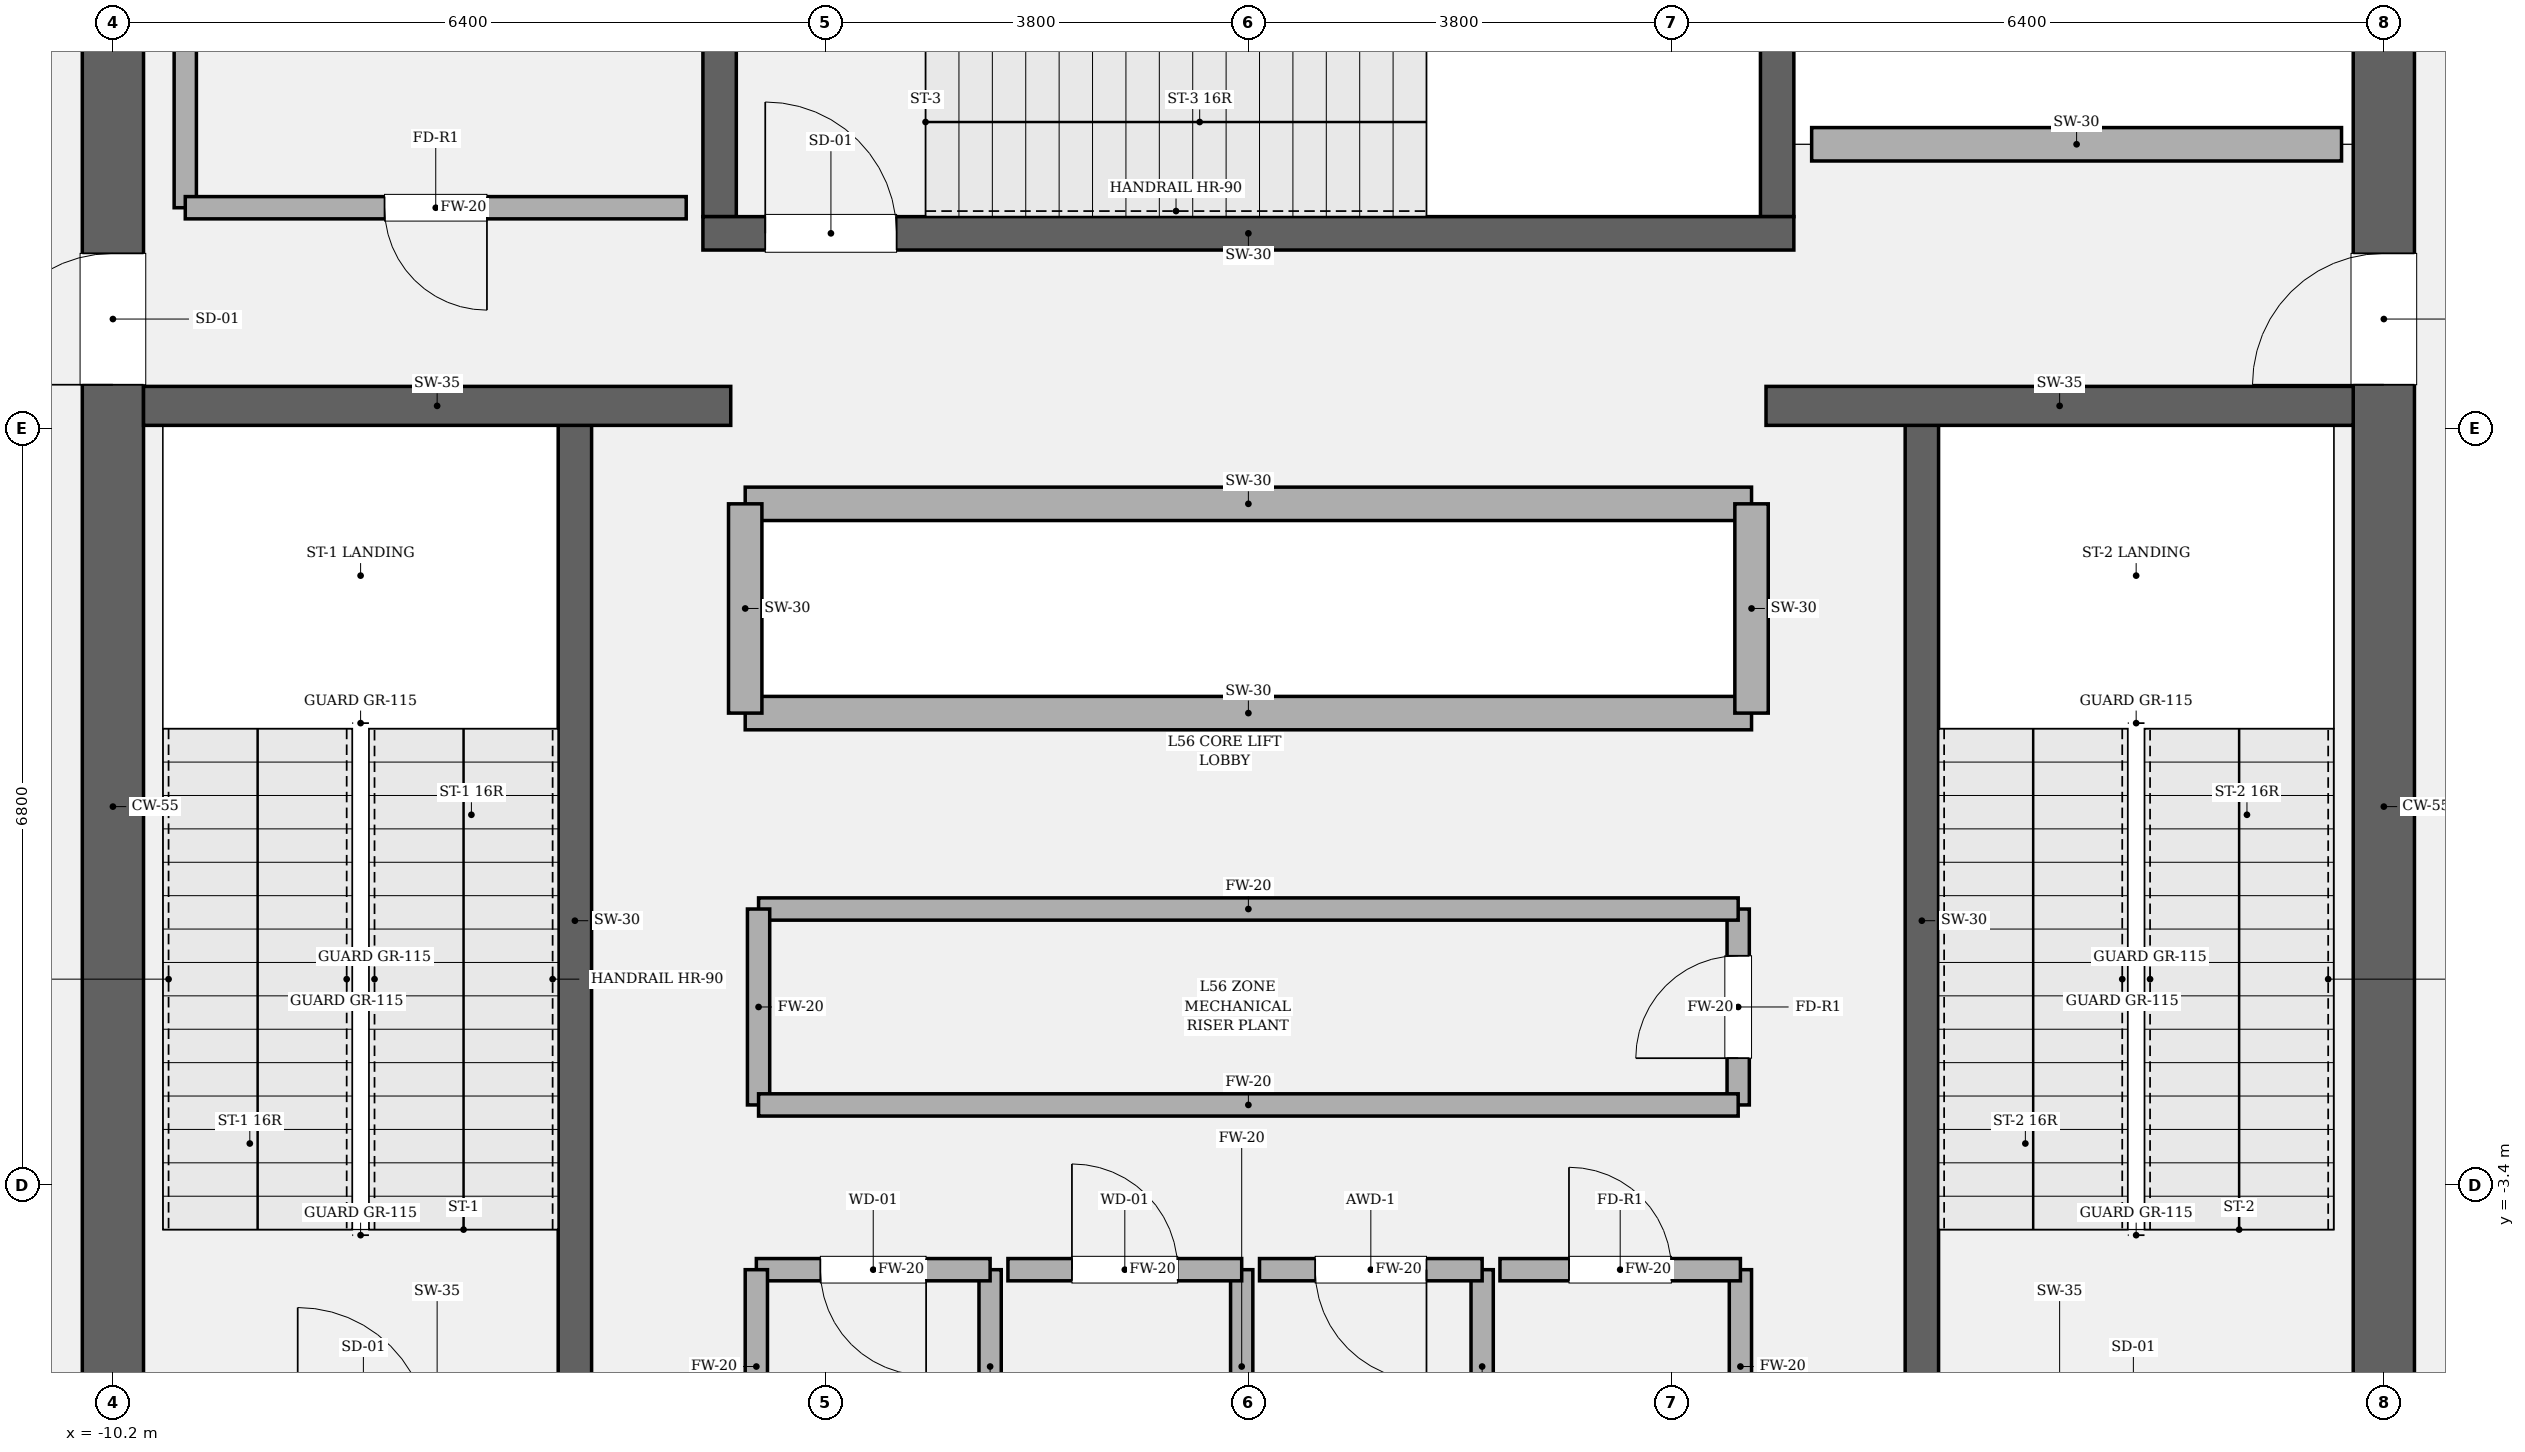
"""IFC4 building model, lengths in metres.
Left out: names, types, materials, properties, quantities, classifications, styles, units other than length and angle.
Written with IfcOpenShell. Run it as: python <this file> out.ifc"""

import sys

from ifc_helpers import new_model, si_unit, direction, frame, frame_2d, origin, place, context, subcontext, project, spatial, rectangle, extrude, element, fill, save


model = new_model("IFC4")
c1 = context("Model", 3, precision=1e-05, world=origin(), true_north=direction((0.0, 1.0)))
c2 = subcontext(c1, "Body", "Model", "MODEL_VIEW")
j1 = project(units=[si_unit("LENGTHUNIT", "METRE"), si_unit("PLANEANGLEUNIT", "RADIAN")], contexts=[c1])
p1 = place(None, origin())
s1 = spatial("IfcSite", under=j1, at=p1, CompositionType="ELEMENT")
p2 = place(p1, origin())
s2 = spatial("IfcBuilding", under=s1, at=p2, CompositionType="ELEMENT")
p3 = place(p2, frame((0.0, 0.0, 237.0)))
s3 = spatial("IfcBuildingStorey", under=s2, at=p3, CompositionType="ELEMENT", Elevation=237.0)
p4 = place(p3, frame((-10.2, -8.925, 0.0), z_axis=(0.0, 0.0, 1.0), x_axis=(0.0, 1.0, 0.0)))
e1 = element("IfcWall", 1, at=p4, inside=s3, PredefinedType="SHEAR", context=c2, shape_type="SweptSolid", body=[
    extrude(rectangle(XDim=17.85, YDim=0.55, at=frame_2d((8.925, 0.0))), origin(), (0.0, 0.0, 1.0), 4.8),
])
p5 = place(p4, frame((12.715, 0.0, 0.0)))
e2 = element("IfcOpeningElement", 2, at=p5, cuts=e1, PredefinedType="OPENING", context=c2, shape_type="SweptSolid", body=[
    extrude(rectangle(XDim=1.18, YDim=2.2, at=frame_2d((0.59, 1.1))), frame((0.0, 0.285, 0.0), z_axis=(0.0, -1.0, 0.0), x_axis=(1.0, 0.0, 0.0)), (0.0, 0.0, 1.0), 0.57),
])
p6 = place(p3, frame((10.2, 8.925, 0.0), z_axis=(0.0, 0.0, 1.0), x_axis=(0.0, -1.0, 0.0)))
e3 = element("IfcWall", 3, at=p6, inside=s3, PredefinedType="SHEAR", context=c2, shape_type="SweptSolid", body=[
    extrude(rectangle(XDim=17.85, YDim=0.55, at=frame_2d((8.925, 0.0))), origin(), (0.0, 0.0, 1.0), 4.8),
])
p7 = place(p6, frame((3.955, 0.0, 0.0)))
e4 = element("IfcOpeningElement", 4, at=p7, cuts=e3, PredefinedType="OPENING", context=c2, shape_type="SweptSolid", body=[
    extrude(rectangle(XDim=1.18, YDim=2.2, at=frame_2d((0.59, 1.1))), frame((0.0, 0.285, 0.0), z_axis=(0.0, -1.0, 0.0), x_axis=(1.0, 0.0, 0.0)), (0.0, 0.0, 1.0), 0.57),
])
for number, where, z_axis, x_axis in (
    (5, (-6.05, -5.5, 0.0), (0.0, 0.0, 1.0), (0.0, 1.0, 0.0)),
    (6, (6.05, 3.45, 0.0), (0.0, 0.0, 1.0), (0.0, -1.0, 0.0)),
):
    element("IfcWall", number, at=place(p3, frame(where, z_axis=z_axis, x_axis=x_axis)), inside=s3, PredefinedType="SOLIDWALL", context=c2, shape_type="SweptSolid", body=[
        extrude(rectangle(XDim=8.95, YDim=0.3, at=frame_2d((4.475, 0.0))), origin(), (0.0, 0.0, 1.0), 4.8),
    ])
for number, where, z_axis, x_axis in (
    (7, (-4.75, 5.3, 0.0), (0.0, 0.0, 1.0), (0.0, 1.0, 0.0)),
    (8, (4.75, 8.925, 0.0), (0.0, 0.0, 1.0), (0.0, -1.0, 0.0)),
):
    element("IfcWall", number, at=place(p3, frame(where, z_axis=z_axis, x_axis=x_axis)), inside=s3, PredefinedType="SOLIDWALL", context=c2, shape_type="SweptSolid", body=[
        extrude(rectangle(XDim=3.625, YDim=0.3, at=frame_2d((1.812, 0.0))), origin(), (0.0, 0.0, 1.0), 4.8),
    ])
p8 = place(p3, frame((-4.9, 5.15, 0.0), z_axis=(0.0, 0.0, 1.0), x_axis=(1.0, 0.0, 0.0)))
e9 = element("IfcWall", 9, at=p8, inside=s3, PredefinedType="SOLIDWALL", context=c2, shape_type="SweptSolid", body=[
    extrude(rectangle(XDim=9.8, YDim=0.3, at=frame_2d((4.9, 0.0))), origin(), (0.0, 0.0, 1.0), 4.8),
])
p9 = place(p8, frame((0.56, 0.0, 0.0)))
e10 = element("IfcOpeningElement", 10, at=p9, cuts=e9, PredefinedType="OPENING", context=c2, shape_type="SweptSolid", body=[
    extrude(rectangle(XDim=1.18, YDim=2.2, at=frame_2d((0.59, 1.1))), frame((0.0, 0.16, 0.0), z_axis=(0.0, -1.0, 0.0), x_axis=(1.0, 0.0, 0.0)), (0.0, 0.0, 1.0), 0.32),
])
for number, where, z_axis, x_axis in (
    (11, (-9.925, 3.6, 0.0), (0.0, 0.0, 1.0), (1.0, 0.0, 0.0)),
    (12, (4.65, 3.6, 0.0), (0.0, 0.0, 1.0), (1.0, 0.0, 0.0)),
):
    element("IfcWall", number, at=place(p3, frame(where, z_axis=z_axis, x_axis=x_axis)), inside=s3, PredefinedType="SOLIDWALL", context=c2, shape_type="SweptSolid", body=[
        extrude(rectangle(XDim=5.275, YDim=0.35, at=frame_2d((2.638, 0.0))), origin(), (0.0, 0.0, 1.0), 4.8),
    ])
for number, where, z_axis, x_axis in (
    (13, (-4.52, 0.84, 0.0), (0.0, 0.0, 1.0), (1.0, 0.0, 0.0)),
    (14, (-4.52, 2.72, 0.0), (0.0, 0.0, 1.0), (1.0, 0.0, 0.0)),
):
    element("IfcWall", number, at=place(p3, frame(where, z_axis=z_axis, x_axis=x_axis)), inside=s3, PredefinedType="SOLIDWALL", context=c2, shape_type="SweptSolid", body=[
        extrude(rectangle(XDim=9.04, YDim=0.3, at=frame_2d((4.52, 0.0))), origin(), (0.0, 0.0, 1.0), 4.48),
    ])
for number, where, z_axis, x_axis in (
    (15, (-4.52, 0.84, 0.0), (0.0, 0.0, 1.0), (0.0, 1.0, 0.0)),
    (16, (4.52, 0.84, 0.0), (0.0, 0.0, 1.0), (0.0, 1.0, 0.0)),
):
    element("IfcWall", number, at=place(p3, frame(where, z_axis=z_axis, x_axis=x_axis)), inside=s3, PredefinedType="SOLIDWALL", context=c2, shape_type="SweptSolid", body=[
        extrude(rectangle(XDim=1.88, YDim=0.3, at=frame_2d((0.94, 0.0))), origin(), (0.0, 0.0, 1.0), 4.48),
    ])
p10 = place(p3, frame((5.06, 5.95, 0.0), z_axis=(0.0, 0.0, 1.0), x_axis=(1.0, 0.0, 0.0)))
e17 = element("IfcWall", 17, at=p10, inside=s3, PredefinedType="SOLIDWALL", context=c2, shape_type="SweptSolid", body=[
    extrude(rectangle(XDim=4.76, YDim=0.3, at=frame_2d((2.38, 0.0))), origin(), (0.0, 0.0, 1.0), 4.48),
])
p11 = place(p3, frame((-2.32, -5.9, 0.0), z_axis=(0.0, 0.0, 1.0), x_axis=(0.0, 1.0, 0.0)))
e18 = element("IfcWall", 18, at=p11, inside=s3, PredefinedType="SOLIDWALL", context=c2, shape_type="SweptSolid", body=[
    extrude(rectangle(XDim=1.74, YDim=0.2, at=frame_2d((0.87, 0.0))), origin(), (0.0, 0.0, 1.0), 4.48),
])
p12 = place(p3, frame((-2.32, -4.16, 0.0), z_axis=(0.0, 0.0, 1.0), x_axis=(-1.0, 0.0, 0.0)))
e19 = element("IfcWall", 19, at=p12, inside=s3, PredefinedType="SOLIDWALL", context=c2, shape_type="SweptSolid", body=[
    extrude(rectangle(XDim=2.1, YDim=0.2, at=frame_2d((1.05, 0.0))), origin(), (0.0, 0.0, 1.0), 4.48),
])
p13 = place(p12, frame((0.575, 0.0, 0.0)))
e20 = element("IfcOpeningElement", 20, at=p13, cuts=e19, PredefinedType="OPENING", context=c2, shape_type="SweptSolid", body=[
    extrude(rectangle(XDim=0.95, YDim=2.15, at=frame_2d((0.475, 1.075))), frame((0.0, 0.11, 0.0), z_axis=(0.0, -1.0, 0.0), x_axis=(1.0, 0.0, 0.0)), (0.0, 0.0, 1.0), 0.22),
])
for number, where, z_axis, x_axis in (
    (21, (-4.42, -4.16, 0.0), (0.0, 0.0, 1.0), (0.0, -1.0, 0.0)),
    (22, (-0.06, -5.9, 0.0), (0.0, 0.0, 1.0), (0.0, 1.0, 0.0)),
):
    element("IfcWall", number, at=place(p3, frame(where, z_axis=z_axis, x_axis=x_axis)), inside=s3, PredefinedType="SOLIDWALL", context=c2, shape_type="SweptSolid", body=[
        extrude(rectangle(XDim=1.74, YDim=0.2, at=frame_2d((0.87, 0.0))), origin(), (0.0, 0.0, 1.0), 4.48),
    ])
p14 = place(p3, frame((-0.06, -4.16, 0.0), z_axis=(0.0, 0.0, 1.0), x_axis=(-1.0, 0.0, 0.0)))
e23 = element("IfcWall", 23, at=p14, inside=s3, PredefinedType="SOLIDWALL", context=c2, shape_type="SweptSolid", body=[
    extrude(rectangle(XDim=2.1, YDim=0.2, at=frame_2d((1.05, 0.0))), origin(), (0.0, 0.0, 1.0), 4.48),
])
p15 = place(p14, frame((0.575, 0.0, 0.0)))
e24 = element("IfcOpeningElement", 24, at=p15, cuts=e23, PredefinedType="OPENING", context=c2, shape_type="SweptSolid", body=[
    extrude(rectangle(XDim=0.95, YDim=2.15, at=frame_2d((0.475, 1.075))), frame((0.0, 0.11, 0.0), z_axis=(0.0, -1.0, 0.0), x_axis=(1.0, 0.0, 0.0)), (0.0, 0.0, 1.0), 0.22),
])
p16 = place(p3, frame((2.1, -5.9, 0.0), z_axis=(0.0, 0.0, 1.0), x_axis=(0.0, 1.0, 0.0)))
e25 = element("IfcWall", 25, at=p16, inside=s3, PredefinedType="SOLIDWALL", context=c2, shape_type="SweptSolid", body=[
    extrude(rectangle(XDim=1.74, YDim=0.2, at=frame_2d((0.87, 0.0))), origin(), (0.0, 0.0, 1.0), 4.48),
])
p17 = place(p3, frame((2.1, -4.16, 0.0), z_axis=(0.0, 0.0, 1.0), x_axis=(-1.0, 0.0, 0.0)))
e26 = element("IfcWall", 26, at=p17, inside=s3, PredefinedType="SOLIDWALL", context=c2, shape_type="SweptSolid", body=[
    extrude(rectangle(XDim=2.0, YDim=0.2, at=frame_2d((1.0, 0.0))), origin(), (0.0, 0.0, 1.0), 4.48),
])
p18 = place(p17, frame((0.5, 0.0, 0.0)))
e27 = element("IfcOpeningElement", 27, at=p18, cuts=e26, PredefinedType="OPENING", context=c2, shape_type="SweptSolid", body=[
    extrude(rectangle(XDim=1.0, YDim=2.15, at=frame_2d((0.5, 1.075))), frame((0.0, 0.11, 0.0), z_axis=(0.0, -1.0, 0.0), x_axis=(1.0, 0.0, 0.0)), (0.0, 0.0, 1.0), 0.22),
])
p19 = place(p3, frame((4.42, -5.9, 0.0), z_axis=(0.0, 0.0, 1.0), x_axis=(0.0, 1.0, 0.0)))
e28 = element("IfcWall", 28, at=p19, inside=s3, PredefinedType="SOLIDWALL", context=c2, shape_type="SweptSolid", body=[
    extrude(rectangle(XDim=1.74, YDim=0.2, at=frame_2d((0.87, 0.0))), origin(), (0.0, 0.0, 1.0), 4.48),
])
p20 = place(p3, frame((4.42, -4.16, 0.0), z_axis=(0.0, 0.0, 1.0), x_axis=(-1.0, 0.0, 0.0)))
e29 = element("IfcWall", 29, at=p20, inside=s3, PredefinedType="SOLIDWALL", context=c2, shape_type="SweptSolid", body=[
    extrude(rectangle(XDim=2.16, YDim=0.2, at=frame_2d((1.08, 0.0))), origin(), (0.0, 0.0, 1.0), 4.48),
])
p21 = place(p20, frame((0.62, 0.0, 0.0)))
e30 = element("IfcOpeningElement", 30, at=p21, cuts=e29, PredefinedType="OPENING", context=c2, shape_type="SweptSolid", body=[
    extrude(rectangle(XDim=0.92, YDim=2.1, at=frame_2d((0.46, 1.05))), frame((0.0, 0.11, 0.0), z_axis=(0.0, -1.0, 0.0), x_axis=(1.0, 0.0, 0.0)), (0.0, 0.0, 1.0), 0.22),
])
p22 = place(p3, frame((4.4, -2.68, 0.0), z_axis=(0.0, 0.0, 1.0), x_axis=(0.0, 1.0, 0.0)))
e31 = element("IfcWall", 31, at=p22, inside=s3, PredefinedType="SOLIDWALL", context=c2, shape_type="SweptSolid", body=[
    extrude(rectangle(XDim=1.76, YDim=0.2, at=frame_2d((0.88, 0.0))), origin(), (0.0, 0.0, 1.0), 4.48),
])
p23 = place(p22, frame((0.42, 0.0, 0.0)))
e32 = element("IfcOpeningElement", 32, at=p23, cuts=e31, PredefinedType="OPENING", context=c2, shape_type="SweptSolid", body=[
    extrude(rectangle(XDim=0.92, YDim=2.1, at=frame_2d((0.46, 1.05))), frame((0.0, 0.11, 0.0), z_axis=(0.0, -1.0, 0.0), x_axis=(1.0, 0.0, 0.0)), (0.0, 0.0, 1.0), 0.22),
])
p24 = place(p3, frame((4.4, -0.92, 0.0), z_axis=(0.0, 0.0, 1.0), x_axis=(-1.0, 0.0, 0.0)))
e33 = element("IfcWall", 33, at=p24, inside=s3, PredefinedType="SOLIDWALL", context=c2, shape_type="SweptSolid", body=[
    extrude(rectangle(XDim=8.8, YDim=0.2, at=frame_2d((4.4, 0.0))), origin(), (0.0, 0.0, 1.0), 4.48),
])
p25 = place(p3, frame((-4.4, -0.92, 0.0), z_axis=(0.0, 0.0, 1.0), x_axis=(0.0, -1.0, 0.0)))
e34 = element("IfcWall", 34, at=p25, inside=s3, PredefinedType="SOLIDWALL", context=c2, shape_type="SweptSolid", body=[
    extrude(rectangle(XDim=1.76, YDim=0.2, at=frame_2d((0.88, 0.0))), origin(), (0.0, 0.0, 1.0), 4.48),
])
p26 = place(p3, frame((-4.4, -2.68, 0.0), z_axis=(0.0, 0.0, 1.0), x_axis=(1.0, 0.0, 0.0)))
e35 = element("IfcWall", 35, at=p26, inside=s3, PredefinedType="SOLIDWALL", context=c2, shape_type="SweptSolid", body=[
    extrude(rectangle(XDim=8.8, YDim=0.2, at=frame_2d((4.4, 0.0))), origin(), (0.0, 0.0, 1.0), 4.48),
])
p27 = place(p3, frame((-9.55, 8.65, 0.0), z_axis=(0.0, 0.0, 1.0), x_axis=(0.0, -1.0, 0.0)))
e36 = element("IfcWall", 36, at=p27, inside=s3, PredefinedType="SOLIDWALL", context=c2, shape_type="SweptSolid", body=[
    extrude(rectangle(XDim=3.27, YDim=0.2, at=frame_2d((1.635, 0.0))), origin(), (0.0, 0.0, 1.0), 4.48),
])
p28 = place(p3, frame((-9.55, 5.38, 0.0), z_axis=(0.0, 0.0, 1.0), x_axis=(1.0, 0.0, 0.0)))
e37 = element("IfcWall", 37, at=p28, inside=s3, PredefinedType="SOLIDWALL", context=c2, shape_type="SweptSolid", body=[
    extrude(rectangle(XDim=4.5, YDim=0.2, at=frame_2d((2.25, 0.0))), origin(), (0.0, 0.0, 1.0), 4.48),
])
p29 = place(p28, frame((1.79, 0.0, 0.0)))
e38 = element("IfcOpeningElement", 38, at=p29, cuts=e37, PredefinedType="OPENING", context=c2, shape_type="SweptSolid", body=[
    extrude(rectangle(XDim=0.92, YDim=2.1, at=frame_2d((0.46, 1.05))), frame((0.0, 0.11, 0.0), z_axis=(0.0, -1.0, 0.0), x_axis=(1.0, 0.0, 0.0)), (0.0, 0.0, 1.0), 0.22),
])
p30 = place(p9, origin())
e39 = element("IfcDoor", 39, at=p30, inside=s3, OperationType="SINGLE_SWING_LEFT", PredefinedType="DOOR", context=c2, shape_type="SweptSolid", body=[
    extrude(rectangle(XDim=1.18, YDim=2.2, at=frame_2d((0.59, 1.1))), frame((0.0, 0.025, 0.0), z_axis=(0.0, -1.0, 0.0), x_axis=(1.0, 0.0, 0.0)), (0.0, 0.0, 1.0), 0.05),
])
fill(e10, e39)
p31 = place(p5, origin())
e40 = element("IfcDoor", 40, at=p31, inside=s3, OperationType="SINGLE_SWING_LEFT", PredefinedType="DOOR", context=c2, shape_type="SweptSolid", body=[
    extrude(rectangle(XDim=1.18, YDim=2.2, at=frame_2d((0.59, 1.1))), frame((0.0, 0.025, 0.0), z_axis=(0.0, -1.0, 0.0), x_axis=(1.0, 0.0, 0.0)), (0.0, 0.0, 1.0), 0.05),
])
fill(e2, e40)
p32 = place(p7, origin())
e41 = element("IfcDoor", 41, at=p32, inside=s3, OperationType="SINGLE_SWING_RIGHT", PredefinedType="DOOR", context=c2, shape_type="SweptSolid", body=[
    extrude(rectangle(XDim=1.18, YDim=2.2, at=frame_2d((0.59, 1.1))), frame((0.0, 0.025, 0.0), z_axis=(0.0, -1.0, 0.0), x_axis=(1.0, 0.0, 0.0)), (0.0, 0.0, 1.0), 0.05),
])
fill(e4, e41)
p33 = place(p13, origin())
e42 = element("IfcDoor", 42, at=p33, inside=s3, OperationType="SINGLE_SWING_LEFT", PredefinedType="DOOR", context=c2, shape_type="SweptSolid", body=[
    extrude(rectangle(XDim=0.95, YDim=2.15, at=frame_2d((0.475, 1.075))), frame((0.0, 0.025, 0.0), z_axis=(0.0, -1.0, 0.0), x_axis=(1.0, 0.0, 0.0)), (0.0, 0.0, 1.0), 0.05),
])
fill(e20, e42)
p34 = place(p15, origin())
e43 = element("IfcDoor", 43, at=p34, inside=s3, OperationType="SINGLE_SWING_RIGHT", PredefinedType="DOOR", context=c2, shape_type="SweptSolid", body=[
    extrude(rectangle(XDim=0.95, YDim=2.15, at=frame_2d((0.475, 1.075))), frame((0.0, 0.025, 0.0), z_axis=(0.0, -1.0, 0.0), x_axis=(1.0, 0.0, 0.0)), (0.0, 0.0, 1.0), 0.05),
])
fill(e24, e43)
p35 = place(p18, origin())
e44 = element("IfcDoor", 44, at=p35, inside=s3, OperationType="SINGLE_SWING_LEFT", PredefinedType="DOOR", context=c2, shape_type="SweptSolid", body=[
    extrude(rectangle(XDim=1.0, YDim=2.15, at=frame_2d((0.5, 1.075))), frame((0.0, 0.025, 0.0), z_axis=(0.0, -1.0, 0.0), x_axis=(1.0, 0.0, 0.0)), (0.0, 0.0, 1.0), 0.05),
])
fill(e27, e44)
p36 = place(p21, origin())
e45 = element("IfcDoor", 45, at=p36, inside=s3, OperationType="SINGLE_SWING_RIGHT", PredefinedType="DOOR", context=c2, shape_type="SweptSolid", body=[
    extrude(rectangle(XDim=0.92, YDim=2.1, at=frame_2d((0.46, 1.05))), frame((0.0, 0.025, 0.0), z_axis=(0.0, -1.0, 0.0), x_axis=(1.0, 0.0, 0.0)), (0.0, 0.0, 1.0), 0.05),
])
fill(e30, e45)
p37 = place(p23, origin())
e46 = element("IfcDoor", 46, at=p37, inside=s3, OperationType="SINGLE_SWING_LEFT", PredefinedType="DOOR", context=c2, shape_type="SweptSolid", body=[
    extrude(rectangle(XDim=0.92, YDim=2.1, at=frame_2d((0.46, 1.05))), frame((0.0, 0.025, 0.0), z_axis=(0.0, -1.0, 0.0), x_axis=(1.0, 0.0, 0.0)), (0.0, 0.0, 1.0), 0.05),
])
fill(e32, e46)
p38 = place(p29, origin())
e47 = element("IfcDoor", 47, at=p38, inside=s3, OperationType="SINGLE_SWING_RIGHT", PredefinedType="DOOR", context=c2, shape_type="SweptSolid", body=[
    extrude(rectangle(XDim=0.92, YDim=2.1, at=frame_2d((0.46, 1.05))), frame((0.0, 0.025, 0.0), z_axis=(0.0, -1.0, 0.0), x_axis=(1.0, 0.0, 0.0)), (0.0, 0.0, 1.0), 0.05),
])
fill(e38, e47)
save(model, sys.argv[1])
